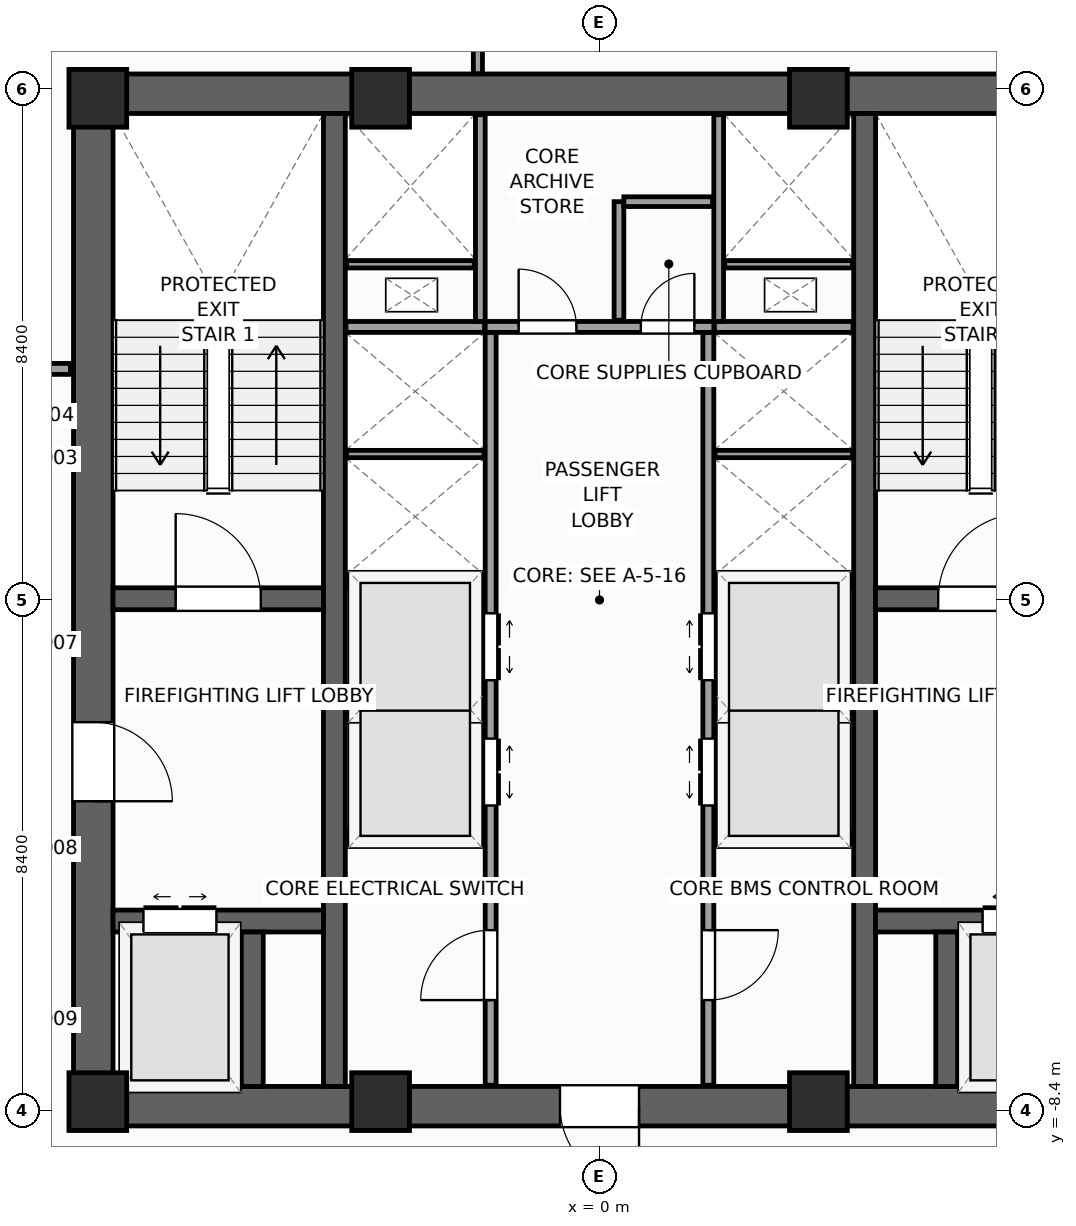
"""IFC4 building model, lengths in metres.
Left out: names, types, materials, properties, quantities, classifications, styles, units other than length and angle.
Written with IfcOpenShell. Run it as: python <this file> out.ifc"""

import sys

from ifc_helpers import new_model, si_unit, direction, frame, frame_2d, origin, origin_2d, place, context, subcontext, project, spatial, rectangle, extrude, source, transform, mapped, element, fill, save


model = new_model("IFC4")
c1 = context("Model", 3, precision=1e-05, world=origin(), true_north=direction((0.0, 1.0)))
c2 = subcontext(c1, "Body", "Model", "MODEL_VIEW")
j1 = project(units=[si_unit("LENGTHUNIT", "METRE"), si_unit("PLANEANGLEUNIT", "RADIAN")], contexts=[c1])
p1 = place(None, origin())
s1 = spatial("IfcSite", under=j1, at=p1, CompositionType="ELEMENT")
p2 = place(p1, origin())
s2 = spatial("IfcBuilding", under=s1, at=p2, CompositionType="ELEMENT")
p3 = place(p2, frame((0.0, 0.0, 184.4)))
s3 = spatial("IfcBuildingStorey", under=s2, at=p3, CompositionType="ELEMENT", Elevation=184.4)
p4 = place(p3, frame((-8.65, -8.325, 0.0), z_axis=(0.0, 0.0, 1.0), x_axis=(1.0, 0.0, 0.0)))
e1 = element("IfcWall", 1, at=p4, inside=s3, PredefinedType="SHEAR", context=c2, shape_type="SweptSolid", body=[
    extrude(rectangle(XDim=17.3, YDim=0.65, at=frame_2d((8.65, 0.0))), origin(), (0.0, 0.0, 1.0), 4.0),
])
p5 = place(p4, frame((8.0, 0.0, 0.0)))
e2 = element("IfcOpeningElement", 2, at=p5, cuts=e1, PredefinedType="OPENING", context=c2, shape_type="SweptSolid", body=[
    extrude(rectangle(XDim=1.3, YDim=2.2, at=frame_2d((0.65, 1.1))), frame((0.0, 0.335, 0.0), z_axis=(0.0, -1.0, 0.0), x_axis=(1.0, 0.0, 0.0)), (0.0, 0.0, 1.0), 0.67),
])
p6 = place(p3, frame((-8.65, 8.325, 0.0), z_axis=(0.0, 0.0, 1.0), x_axis=(1.0, 0.0, 0.0)))
e3 = element("IfcWall", 3, at=p6, inside=s3, PredefinedType="SHEAR", context=c2, shape_type="SweptSolid", body=[
    extrude(rectangle(XDim=17.3, YDim=0.65, at=frame_2d((8.65, 0.0))), origin(), (0.0, 0.0, 1.0), 4.0),
])
p7 = place(p3, frame((-8.325, -8.0, 0.0), z_axis=(0.0, 0.0, 1.0), x_axis=(0.0, 1.0, 0.0)))
e4 = element("IfcWall", 4, at=p7, inside=s3, PredefinedType="SHEAR", context=c2, shape_type="SweptSolid", body=[
    extrude(rectangle(XDim=16.0, YDim=0.65, at=frame_2d((8.0, 0.0))), origin(), (0.0, 0.0, 1.0), 4.0),
])
p8 = place(p7, frame((4.69, 0.0, 0.0)))
e5 = element("IfcOpeningElement", 5, at=p8, cuts=e4, PredefinedType="OPENING", context=c2, shape_type="SweptSolid", body=[
    extrude(rectangle(XDim=1.3, YDim=2.2, at=frame_2d((0.65, 1.1))), frame((0.0, 0.335, 0.0), z_axis=(0.0, -1.0, 0.0), x_axis=(1.0, 0.0, 0.0)), (0.0, 0.0, 1.0), 0.67),
])
for number, where, z_axis, x_axis in (
    (6, (-4.36, -8.0, 0.0), (0.0, 0.0, 1.0), (0.0, 1.0, 0.0)),
    (7, (4.36, -8.0, 0.0), (0.0, 0.0, 1.0), (0.0, 1.0, 0.0)),
):
    element("IfcWall", number, at=place(p3, frame(where, z_axis=z_axis, x_axis=x_axis)), inside=s3, PredefinedType="SHEAR", context=c2, shape_type="SweptSolid", body=[
        extrude(rectangle(XDim=16.0, YDim=0.36, at=frame_2d((8.0, 0.0))), origin(), (0.0, 0.0, 1.0), 4.0),
    ])
p9 = place(p3, frame((-8.0, 0.02, 0.0), z_axis=(0.0, 0.0, 1.0), x_axis=(1.0, 0.0, 0.0)))
e8 = element("IfcWall", 8, at=p9, inside=s3, PredefinedType="SHEAR", context=c2, shape_type="SweptSolid", body=[
    extrude(rectangle(XDim=3.46, YDim=0.36, at=frame_2d((1.73, 0.0))), origin(), (0.0, 0.0, 1.0), 4.0),
])
p10 = place(p9, frame((1.03, 0.0, 0.0)))
e9 = element("IfcOpeningElement", 9, at=p10, cuts=e8, PredefinedType="OPENING", context=c2, shape_type="SweptSolid", body=[
    extrude(rectangle(XDim=1.4, YDim=2.2, at=frame_2d((0.7, 1.1))), frame((0.0, 0.19, 0.0), z_axis=(0.0, -1.0, 0.0), x_axis=(1.0, 0.0, 0.0)), (0.0, 0.0, 1.0), 0.38),
])
p11 = place(p3, frame((4.54, 0.02, 0.0), z_axis=(0.0, 0.0, 1.0), x_axis=(1.0, 0.0, 0.0)))
e10 = element("IfcWall", 10, at=p11, inside=s3, PredefinedType="SHEAR", context=c2, shape_type="SweptSolid", body=[
    extrude(rectangle(XDim=3.46, YDim=0.36, at=frame_2d((1.73, 0.0))), origin(), (0.0, 0.0, 1.0), 4.0),
])
p12 = place(p11, frame((1.03, 0.0, 0.0)))
e11 = element("IfcOpeningElement", 11, at=p12, cuts=e10, PredefinedType="OPENING", context=c2, shape_type="SweptSolid", body=[
    extrude(rectangle(XDim=1.4, YDim=2.2, at=frame_2d((0.7, 1.1))), frame((0.0, 0.19, 0.0), z_axis=(0.0, -1.0, 0.0), x_axis=(1.0, 0.0, 0.0)), (0.0, 0.0, 1.0), 0.38),
])
p13 = place(p3, frame((-8.0, -5.28, 0.0), z_axis=(0.0, 0.0, 1.0), x_axis=(1.0, 0.0, 0.0)))
e12 = element("IfcWall", 12, at=p13, inside=s3, PredefinedType="SHEAR", context=c2, shape_type="SweptSolid", body=[
    extrude(rectangle(XDim=3.46, YDim=0.36, at=frame_2d((1.73, 0.0))), origin(), (0.0, 0.0, 1.0), 4.0),
])
p14 = place(p13, frame((0.5, 0.0, 0.0)))
e13 = element("IfcOpeningElement", 13, at=p14, cuts=e12, PredefinedType="OPENING", context=c2, shape_type="SweptSolid", body=[
    extrude(rectangle(XDim=1.2, YDim=2.25, at=frame_2d((0.6, 1.125))), frame((0.0, 0.19, 0.0), z_axis=(0.0, -1.0, 0.0), x_axis=(1.0, 0.0, 0.0)), (0.0, 0.0, 1.0), 0.38),
])
p15 = place(p3, frame((4.54, -5.28, 0.0), z_axis=(0.0, 0.0, 1.0), x_axis=(1.0, 0.0, 0.0)))
e14 = element("IfcWall", 14, at=p15, inside=s3, PredefinedType="SHEAR", context=c2, shape_type="SweptSolid", body=[
    extrude(rectangle(XDim=3.46, YDim=0.36, at=frame_2d((1.73, 0.0))), origin(), (0.0, 0.0, 1.0), 4.0),
])
p16 = place(p15, frame((1.76, 0.0, 0.0)))
e15 = element("IfcOpeningElement", 15, at=p16, cuts=e14, PredefinedType="OPENING", context=c2, shape_type="SweptSolid", body=[
    extrude(rectangle(XDim=1.2, YDim=2.25, at=frame_2d((0.6, 1.125))), frame((0.0, 0.19, 0.0), z_axis=(0.0, -1.0, 0.0), x_axis=(1.0, 0.0, 0.0)), (0.0, 0.0, 1.0), 0.38),
])
for number, where, z_axis, x_axis in (
    (16, (-5.71, -8.0, 0.0), (0.0, 0.0, 1.0), (0.0, 1.0, 0.0)),
    (17, (5.71, -8.0, 0.0), (0.0, 0.0, 1.0), (0.0, 1.0, 0.0)),
):
    element("IfcWall", number, at=place(p3, frame(where, z_axis=z_axis, x_axis=x_axis)), inside=s3, PredefinedType="SHEAR", context=c2, shape_type="SweptSolid", body=[
        extrude(rectangle(XDim=2.54, YDim=0.36, at=frame_2d((1.27, 0.0))), origin(), (0.0, 0.0, 1.0), 4.0),
    ])
m1 = source(origin(), c2, "Body", "SweptSolid", [
    extrude(rectangle(XDim=0.95, YDim=0.95, at=origin_2d()), origin(), (0.0, 0.0, 1.0), 4.0),
])
for number, where, z_axis, x_axis in (
    (18, (-8.25, -8.25, 0.0), (0.0, 0.0, 1.0), (1.0, 0.0, 0.0)),
    (19, (-8.25, 8.25, 0.0), (0.0, 0.0, 1.0), (1.0, 0.0, 0.0)),
    (20, (-3.6, -8.25, 0.0), (0.0, 0.0, 1.0), (1.0, 0.0, 0.0)),
    (21, (3.6, -8.25, 0.0), (0.0, 0.0, 1.0), (1.0, 0.0, 0.0)),
    (22, (-3.6, 8.25, 0.0), (0.0, 0.0, 1.0), (1.0, 0.0, 0.0)),
    (23, (3.6, 8.25, 0.0), (0.0, 0.0, 1.0), (1.0, 0.0, 0.0)),
):
    element("IfcColumn", number, at=place(p3, frame(where, z_axis=z_axis, x_axis=x_axis)), inside=s3, PredefinedType="PILASTER", context=c2, shape_type="MappedRepresentation", body=[
        mapped(m1, transform((0.0, 0.0, 0.0), scale=1.0)),
    ])
p17 = place(p3, frame((-1.79, -7.98, 0.0), z_axis=(0.0, 0.0, 1.0), x_axis=(0.0, 1.0, 0.0)))
e24 = element("IfcWall", 24, at=p17, inside=s3, PredefinedType="PARTITIONING", context=c2, shape_type="SweptSolid", body=[
    extrude(rectangle(XDim=12.38, YDim=0.18, at=frame_2d((6.19, 0.0))), origin(), (0.0, 0.0, 1.0), 3.74),
])
p18 = place(p17, frame((4.6, 0.0, 0.0)))
e25 = element("IfcOpeningElement", 25, at=p18, cuts=e24, PredefinedType="OPENING", context=c2, shape_type="SweptSolid", body=[
    extrude(rectangle(XDim=1.1, YDim=2.2, at=frame_2d((0.55, 1.1))), frame((0.0, 0.1, 0.0), z_axis=(0.0, -1.0, 0.0), x_axis=(1.0, 0.0, 0.0)), (0.0, 0.0, 1.0), 0.2),
])
p19 = place(p17, frame((6.66, 0.0, 0.0)))
e26 = element("IfcOpeningElement", 26, at=p19, cuts=e24, PredefinedType="OPENING", context=c2, shape_type="SweptSolid", body=[
    extrude(rectangle(XDim=1.1, YDim=2.2, at=frame_2d((0.55, 1.1))), frame((0.0, 0.1, 0.0), z_axis=(0.0, -1.0, 0.0), x_axis=(1.0, 0.0, 0.0)), (0.0, 0.0, 1.0), 0.2),
])
p20 = place(p17, frame((1.4, 0.0, 0.0)))
e27 = element("IfcOpeningElement", 27, at=p20, cuts=e24, PredefinedType="OPENING", context=c2, shape_type="SweptSolid", body=[
    extrude(rectangle(XDim=1.15, YDim=2.25, at=frame_2d((0.575, 1.125))), frame((0.0, 0.1, 0.0), z_axis=(0.0, -1.0, 0.0), x_axis=(1.0, 0.0, 0.0)), (0.0, 0.0, 1.0), 0.2),
])
p21 = place(p3, frame((1.79, -7.98, 0.0), z_axis=(0.0, 0.0, 1.0), x_axis=(0.0, 1.0, 0.0)))
e28 = element("IfcWall", 28, at=p21, inside=s3, PredefinedType="PARTITIONING", context=c2, shape_type="SweptSolid", body=[
    extrude(rectangle(XDim=12.38, YDim=0.18, at=frame_2d((6.19, 0.0))), origin(), (0.0, 0.0, 1.0), 3.74),
])
p22 = place(p21, frame((4.6, 0.0, 0.0)))
e29 = element("IfcOpeningElement", 29, at=p22, cuts=e28, PredefinedType="OPENING", context=c2, shape_type="SweptSolid", body=[
    extrude(rectangle(XDim=1.1, YDim=2.2, at=frame_2d((0.55, 1.1))), frame((0.0, 0.1, 0.0), z_axis=(0.0, -1.0, 0.0), x_axis=(1.0, 0.0, 0.0)), (0.0, 0.0, 1.0), 0.2),
])
p23 = place(p21, frame((6.66, 0.0, 0.0)))
e30 = element("IfcOpeningElement", 30, at=p23, cuts=e28, PredefinedType="OPENING", context=c2, shape_type="SweptSolid", body=[
    extrude(rectangle(XDim=1.1, YDim=2.2, at=frame_2d((0.55, 1.1))), frame((0.0, 0.1, 0.0), z_axis=(0.0, -1.0, 0.0), x_axis=(1.0, 0.0, 0.0)), (0.0, 0.0, 1.0), 0.2),
])
p24 = place(p21, frame((1.4, 0.0, 0.0)))
e31 = element("IfcOpeningElement", 31, at=p24, cuts=e28, PredefinedType="OPENING", context=c2, shape_type="SweptSolid", body=[
    extrude(rectangle(XDim=1.15, YDim=2.25, at=frame_2d((0.575, 1.125))), frame((0.0, 0.1, 0.0), z_axis=(0.0, -1.0, 0.0), x_axis=(1.0, 0.0, 0.0)), (0.0, 0.0, 1.0), 0.2),
])
p25 = place(p3, frame((-1.88, 4.49, 0.0), z_axis=(0.0, 0.0, 1.0), x_axis=(1.0, 0.0, 0.0)))
e32 = element("IfcWall", 32, at=p25, inside=s3, PredefinedType="PARTITIONING", context=c2, shape_type="SweptSolid", body=[
    extrude(rectangle(XDim=3.76, YDim=0.18, at=frame_2d((1.88, 0.0))), origin(), (0.0, 0.0, 1.0), 3.74),
])
p26 = place(p25, frame((0.55, 0.0, 0.0)))
e33 = element("IfcOpeningElement", 33, at=p26, cuts=e32, PredefinedType="OPENING", context=c2, shape_type="SweptSolid", body=[
    extrude(rectangle(XDim=0.95, YDim=2.1, at=frame_2d((0.475, 1.05))), frame((0.0, 0.1, 0.0), z_axis=(0.0, -1.0, 0.0), x_axis=(1.0, 0.0, 0.0)), (0.0, 0.0, 1.0), 0.2),
])
p27 = place(p25, frame((2.56, 0.0, 0.0)))
e34 = element("IfcOpeningElement", 34, at=p27, cuts=e32, PredefinedType="OPENING", context=c2, shape_type="SweptSolid", body=[
    extrude(rectangle(XDim=0.88, YDim=2.1, at=frame_2d((0.44, 1.05))), frame((0.0, 0.1, 0.0), z_axis=(0.0, -1.0, 0.0), x_axis=(1.0, 0.0, 0.0)), (0.0, 0.0, 1.0), 0.2),
])
for number, where, z_axis, x_axis in (
    (35, (-4.17, -3.9, 0.0), (0.0, 0.0, 1.0), (1.0, 0.0, 0.0)),
    (36, (1.89, -3.9, 0.0), (0.0, 0.0, 1.0), (1.0, 0.0, 0.0)),
    (37, (-4.17, 0.3, 0.0), (0.0, 0.0, 1.0), (1.0, 0.0, 0.0)),
    (38, (1.89, 0.3, 0.0), (0.0, 0.0, 1.0), (1.0, 0.0, 0.0)),
    (39, (-4.17, 4.49, 0.0), (0.0, 0.0, 1.0), (1.0, 0.0, 0.0)),
    (40, (1.89, 4.49, 0.0), (0.0, 0.0, 1.0), (1.0, 0.0, 0.0)),
):
    element("IfcWall", number, at=place(p3, frame(where, z_axis=z_axis, x_axis=x_axis)), inside=s3, PredefinedType="PARTITIONING", context=c2, shape_type="SweptSolid", body=[
        extrude(rectangle(XDim=2.28, YDim=0.18, at=frame_2d((1.14, 0.0))), origin(), (0.0, 0.0, 1.0), 3.74),
    ])
for number, where, z_axis, x_axis in (
    (41, (-4.16, -1.8, 0.0), (0.0, 0.0, 1.0), (1.0, 0.0, 0.0)),
    (42, (1.9, -1.8, 0.0), (0.0, 0.0, 1.0), (1.0, 0.0, 0.0)),
    (43, (-4.16, 2.4, 0.0), (0.0, 0.0, 1.0), (1.0, 0.0, 0.0)),
    (44, (1.9, 2.4, 0.0), (0.0, 0.0, 1.0), (1.0, 0.0, 0.0)),
):
    element("IfcWall", number, at=place(p3, frame(where, z_axis=z_axis, x_axis=x_axis)), inside=s3, PredefinedType="PARTITIONING", context=c2, shape_type="SweptSolid", body=[
        extrude(rectangle(XDim=2.26, YDim=0.12, at=frame_2d((1.13, 0.0))), origin(), (0.0, 0.0, 1.0), 3.74),
    ])
for number, where, z_axis, x_axis in (
    (45, (-1.96, 4.58, 0.0), (0.0, 0.0, 1.0), (0.0, 1.0, 0.0)),
    (46, (1.96, 4.58, 0.0), (0.0, 0.0, 1.0), (0.0, 1.0, 0.0)),
):
    element("IfcWall", number, at=place(p3, frame(where, z_axis=z_axis, x_axis=x_axis)), inside=s3, PredefinedType="PARTITIONING", context=c2, shape_type="SweptSolid", body=[
        extrude(rectangle(XDim=3.4, YDim=0.16, at=frame_2d((1.7, 0.0))), origin(), (0.0, 0.0, 1.0), 3.74),
    ])
for number, where, z_axis, x_axis in (
    (47, (-4.16, 5.52, 0.0), (0.0, 0.0, 1.0), (1.0, 0.0, 0.0)),
    (48, (2.06, 5.52, 0.0), (0.0, 0.0, 1.0), (1.0, 0.0, 0.0)),
):
    element("IfcWall", number, at=place(p3, frame(where, z_axis=z_axis, x_axis=x_axis)), inside=s3, PredefinedType="PARTITIONING", context=c2, shape_type="SweptSolid", body=[
        extrude(rectangle(XDim=2.1, YDim=0.12, at=frame_2d((1.05, 0.0))), origin(), (0.0, 0.0, 1.0), 3.74),
    ])
p28 = place(p3, frame((0.32, 4.6, 0.0), z_axis=(0.0, 0.0, 1.0), x_axis=(0.0, 1.0, 0.0)))
e49 = element("IfcWall", 49, at=p28, inside=s3, PredefinedType="PARTITIONING", context=c2, shape_type="SweptSolid", body=[
    extrude(rectangle(XDim=1.95, YDim=0.16, at=frame_2d((0.975, 0.0))), origin(), (0.0, 0.0, 1.0), 3.74),
])
p29 = place(p3, frame((0.4, 6.55, 0.0), z_axis=(0.0, 0.0, 1.0), x_axis=(1.0, 0.0, 0.0)))
e50 = element("IfcWall", 50, at=p29, inside=s3, PredefinedType="PARTITIONING", context=c2, shape_type="SweptSolid", body=[
    extrude(rectangle(XDim=1.46, YDim=0.16, at=frame_2d((0.73, 0.0))), origin(), (0.0, 0.0, 1.0), 3.74),
])
p30 = place(p3, frame((-10.45, 3.8, 0.0), z_axis=(0.0, 0.0, 1.0), x_axis=(1.0, 0.0, 0.0)))
e51 = element("IfcWall", 51, at=p30, inside=s3, PredefinedType="PARTITIONING", context=c2, shape_type="SweptSolid", body=[
    extrude(rectangle(XDim=1.75, YDim=0.18, at=frame_2d((0.875, 0.0))), origin(), (0.0, 0.0, 1.0), 3.74),
])
p31 = place(p30, frame((0.325, 0.0, 0.0)))
e52 = element("IfcOpeningElement", 52, at=p31, cuts=e51, PredefinedType="OPENING", context=c2, shape_type="SweptSolid", body=[
    extrude(rectangle(XDim=1.1, YDim=2.2, at=frame_2d((0.55, 1.1))), frame((0.0, 0.1, 0.0), z_axis=(0.0, -1.0, 0.0), x_axis=(1.0, 0.0, 0.0)), (0.0, 0.0, 1.0), 0.2),
])
p32 = place(p3, frame((-2.0, 8.655, 0.0), z_axis=(0.0, 0.0, 1.0), x_axis=(0.0, 1.0, 0.0)))
e53 = element("IfcWall", 53, at=p32, inside=s3, PredefinedType="PARTITIONING", context=c2, shape_type="SweptSolid", body=[
    extrude(rectangle(XDim=20.423, YDim=0.15, at=frame_2d((10.211, 0.0))), origin(), (0.0, 0.0, 1.0), 3.74),
])
m2 = source(origin(), c2, "Body", "SweptSolid", [
    extrude(rectangle(XDim=1.4, YDim=2.2, at=frame_2d((0.7, 1.1))), frame((0.0, 0.025, 0.0), z_axis=(0.0, -1.0, 0.0), x_axis=(1.0, 0.0, 0.0)), (0.0, 0.0, 1.0), 0.05),
])
p33 = place(p10, origin())
e54 = element("IfcDoor", 54, at=p33, inside=s3, OperationType="SINGLE_SWING_LEFT", PredefinedType="DOOR", context=c2, shape_type="MappedRepresentation", body=[
    mapped(m2, transform((0.0, 0.0, 0.0), scale=1.0)),
])
fill(e9, e54)
p34 = place(p12, origin())
e55 = element("IfcDoor", 55, at=p34, inside=s3, OperationType="SINGLE_SWING_RIGHT", PredefinedType="DOOR", context=c2, shape_type="MappedRepresentation", body=[
    mapped(m2, transform((0.0, 0.0, 0.0), scale=1.0)),
])
fill(e11, e55)
m3 = source(origin(), c2, "Body", "SweptSolid", [
    extrude(rectangle(XDim=1.3, YDim=2.2, at=frame_2d((0.65, 1.1))), frame((0.0, 0.025, 0.0), z_axis=(0.0, -1.0, 0.0), x_axis=(1.0, 0.0, 0.0)), (0.0, 0.0, 1.0), 0.05),
])
p35 = place(p8, frame((1.3, 0.0, 0.0), z_axis=(0.0, 0.0, 1.0), x_axis=(-1.0, 0.0, 0.0)))
e56 = element("IfcDoor", 56, at=p35, inside=s3, OperationType="SINGLE_SWING_LEFT", PredefinedType="DOOR", context=c2, shape_type="MappedRepresentation", body=[
    mapped(m3, transform((0.0, 0.0, 0.0), scale=1.0)),
])
fill(e5, e56)
p36 = place(p5, frame((1.3, 0.0, 0.0), z_axis=(0.0, 0.0, 1.0), x_axis=(-1.0, 0.0, 0.0)))
e57 = element("IfcDoor", 57, at=p36, inside=s3, OperationType="SINGLE_SWING_RIGHT", PredefinedType="DOOR", context=c2, shape_type="MappedRepresentation", body=[
    mapped(m3, transform((0.0, 0.0, 0.0), scale=1.0)),
])
fill(e2, e57)
m4 = source(origin(), c2, "Body", "SweptSolid", [
    extrude(rectangle(XDim=1.2, YDim=2.25, at=frame_2d((0.6, 1.125))), frame((0.0, 0.025, 0.0), z_axis=(0.0, -1.0, 0.0), x_axis=(1.0, 0.0, 0.0)), (0.0, 0.0, 1.0), 0.05),
])
p37 = place(p14, origin())
e58 = element("IfcDoor", 58, at=p37, inside=s3, OperationType="DOUBLE_DOOR_SLIDING", PredefinedType="DOOR", context=c2, shape_type="MappedRepresentation", body=[
    mapped(m4, transform((0.0, 0.0, 0.0), scale=1.0)),
])
fill(e13, e58)
p38 = place(p16, origin())
e59 = element("IfcDoor", 59, at=p38, inside=s3, OperationType="DOUBLE_DOOR_SLIDING", PredefinedType="DOOR", context=c2, shape_type="MappedRepresentation", body=[
    mapped(m4, transform((0.0, 0.0, 0.0), scale=1.0)),
])
fill(e15, e59)
m5 = source(origin(), c2, "Body", "SweptSolid", [
    extrude(rectangle(XDim=1.1, YDim=2.2, at=frame_2d((0.55, 1.1))), frame((0.0, 0.025, 0.0), z_axis=(0.0, -1.0, 0.0), x_axis=(1.0, 0.0, 0.0)), (0.0, 0.0, 1.0), 0.05),
])
p39 = place(p18, frame((1.1, 0.0, 0.0), z_axis=(0.0, 0.0, 1.0), x_axis=(-1.0, 0.0, 0.0)))
e60 = element("IfcDoor", 60, at=p39, inside=s3, OperationType="DOUBLE_DOOR_SLIDING", PredefinedType="DOOR", context=c2, shape_type="MappedRepresentation", body=[
    mapped(m5, transform((0.0, 0.0, 0.0), scale=1.0)),
])
fill(e25, e60)
p40 = place(p19, frame((1.1, 0.0, 0.0), z_axis=(0.0, 0.0, 1.0), x_axis=(-1.0, 0.0, 0.0)))
e61 = element("IfcDoor", 61, at=p40, inside=s3, OperationType="DOUBLE_DOOR_SLIDING", PredefinedType="DOOR", context=c2, shape_type="MappedRepresentation", body=[
    mapped(m5, transform((0.0, 0.0, 0.0), scale=1.0)),
])
fill(e26, e61)
p41 = place(p22, origin())
e62 = element("IfcDoor", 62, at=p41, inside=s3, OperationType="DOUBLE_DOOR_SLIDING", PredefinedType="DOOR", context=c2, shape_type="MappedRepresentation", body=[
    mapped(m5, transform((0.0, 0.0, 0.0), scale=1.0)),
])
fill(e29, e62)
p42 = place(p23, origin())
e63 = element("IfcDoor", 63, at=p42, inside=s3, OperationType="DOUBLE_DOOR_SLIDING", PredefinedType="DOOR", context=c2, shape_type="MappedRepresentation", body=[
    mapped(m5, transform((0.0, 0.0, 0.0), scale=1.0)),
])
fill(e30, e63)
m6 = source(origin(), c2, "Body", "SweptSolid", [
    extrude(rectangle(XDim=1.15, YDim=2.25, at=frame_2d((0.575, 1.125))), frame((0.0, 0.025, 0.0), z_axis=(0.0, -1.0, 0.0), x_axis=(1.0, 0.0, 0.0)), (0.0, 0.0, 1.0), 0.05),
])
p43 = place(p20, origin())
e64 = element("IfcDoor", 64, at=p43, inside=s3, OperationType="SINGLE_SWING_LEFT", PredefinedType="DOOR", context=c2, shape_type="MappedRepresentation", body=[
    mapped(m6, transform((0.0, 0.0, 0.0), scale=1.0)),
])
fill(e27, e64)
p44 = place(p24, frame((1.15, 0.0, 0.0), z_axis=(0.0, 0.0, 1.0), x_axis=(-1.0, 0.0, 0.0)))
e65 = element("IfcDoor", 65, at=p44, inside=s3, OperationType="SINGLE_SWING_RIGHT", PredefinedType="DOOR", context=c2, shape_type="MappedRepresentation", body=[
    mapped(m6, transform((0.0, 0.0, 0.0), scale=1.0)),
])
fill(e31, e65)
m7 = source(origin(), c2, "Body", "SweptSolid", [
    extrude(rectangle(XDim=0.95, YDim=2.1, at=frame_2d((0.475, 1.05))), frame((0.0, 0.025, 0.0), z_axis=(0.0, -1.0, 0.0), x_axis=(1.0, 0.0, 0.0)), (0.0, 0.0, 1.0), 0.05),
])
p45 = place(p26, origin())
e66 = element("IfcDoor", 66, at=p45, inside=s3, OperationType="SINGLE_SWING_LEFT", PredefinedType="DOOR", context=c2, shape_type="MappedRepresentation", body=[
    mapped(m7, transform((0.0, 0.0, 0.0), scale=1.0)),
])
fill(e33, e66)
m8 = source(origin(), c2, "Body", "SweptSolid", [
    extrude(rectangle(XDim=0.88, YDim=2.1, at=frame_2d((0.44, 1.05))), frame((0.0, 0.025, 0.0), z_axis=(0.0, -1.0, 0.0), x_axis=(1.0, 0.0, 0.0)), (0.0, 0.0, 1.0), 0.05),
])
p46 = place(p27, origin())
e67 = element("IfcDoor", 67, at=p46, inside=s3, OperationType="SINGLE_SWING_RIGHT", PredefinedType="DOOR", context=c2, shape_type="MappedRepresentation", body=[
    mapped(m8, transform((0.0, 0.0, 0.0), scale=1.0)),
])
fill(e34, e67)
save(model, sys.argv[1])
